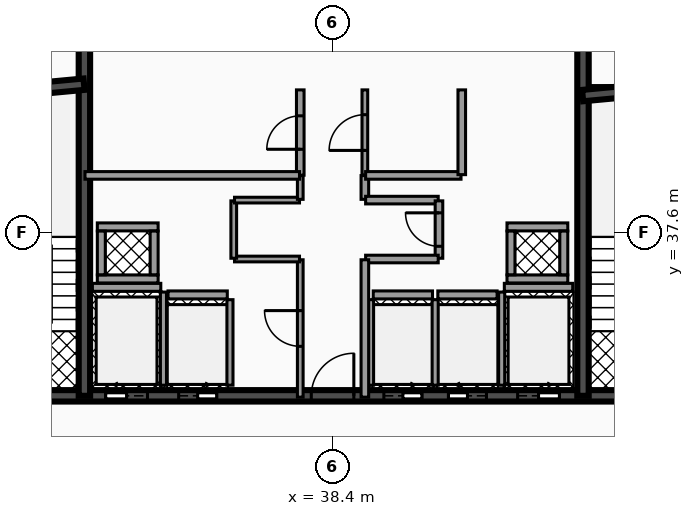
"""IFC4 building model, lengths in metres.
Left out: names, types, materials, properties, quantities, classifications, styles, units other than length and angle.
Written with IfcOpenShell. Run it as: python <this file> out.ifc"""

import sys

from ifc_helpers import new_model, si_unit, direction, frame, frame_2d, origin, place, context, subcontext, project, spatial, rectangle, extrude, element, fill, save


model = new_model("IFC4")
c1 = context("Model", 3, precision=1e-05, world=origin(), true_north=direction((0.0, 1.0)))
c2 = subcontext(c1, "Body", "Model", "MODEL_VIEW")
j1 = project(units=[si_unit("LENGTHUNIT", "METRE"), si_unit("PLANEANGLEUNIT", "RADIAN")], contexts=[c1])
p1 = place(None, origin())
s1 = spatial("IfcSite", under=j1, at=p1, CompositionType="ELEMENT")
p2 = place(p1, origin())
s2 = spatial("IfcBuilding", under=s1, at=p2, CompositionType="ELEMENT")
p3 = place(p2, frame((0.0, 0.0, 295.8)))
s3 = spatial("IfcBuildingStorey", under=s2, at=p3, CompositionType="ELEMENT", Elevation=295.8)
p4 = place(p3, frame((28.5, 33.3, 0.0), z_axis=(0.0, 0.0, 1.0), x_axis=(1.0, 0.0, 0.0)))
e1 = element("IfcWall", 1, at=p4, inside=s3, PredefinedType="SHEAR", context=c2, shape_type="SweptSolid", body=[
    extrude(rectangle(XDim=19.86, YDim=0.3, at=frame_2d((9.93, 0.0))), origin(), (0.0, 0.0, 1.0), 3.18),
])
p5 = place(p4, frame((3.93, 0.0, 0.0)))
e2 = element("IfcOpeningElement", 2, at=p5, cuts=e1, PredefinedType="OPENING", context=c2, shape_type="SweptSolid", body=[
    extrude(rectangle(XDim=1.1, YDim=2.15, at=frame_2d((0.55, 1.075))), frame((0.0, 0.16, 0.0), z_axis=(0.0, -1.0, 0.0), x_axis=(1.0, 0.0, 0.0)), (0.0, 0.0, 1.0), 0.32),
])
p6 = place(p4, frame((14.77, 0.0, 0.0)))
e3 = element("IfcOpeningElement", 3, at=p6, cuts=e1, PredefinedType="OPENING", context=c2, shape_type="SweptSolid", body=[
    extrude(rectangle(XDim=1.1, YDim=2.15, at=frame_2d((0.55, 1.075))), frame((0.0, 0.16, 0.0), z_axis=(0.0, -1.0, 0.0), x_axis=(1.0, 0.0, 0.0)), (0.0, 0.0, 1.0), 0.32),
])
p7 = place(p4, frame((11.25, 0.0, 0.0)))
e4 = element("IfcOpeningElement", 4, at=p7, cuts=e1, PredefinedType="OPENING", context=c2, shape_type="SweptSolid", body=[
    extrude(rectangle(XDim=1.0, YDim=2.1, at=frame_2d((0.5, 1.05))), frame((0.0, 0.16, 0.0), z_axis=(0.0, -1.0, 0.0), x_axis=(1.0, 0.0, 0.0)), (0.0, 0.0, 1.0), 0.32),
])
p8 = place(p4, frame((12.95, 0.0, 0.0)))
e5 = element("IfcOpeningElement", 5, at=p8, cuts=e1, PredefinedType="OPENING", context=c2, shape_type="SweptSolid", body=[
    extrude(rectangle(XDim=1.0, YDim=2.1, at=frame_2d((0.5, 1.05))), frame((0.0, 0.16, 0.0), z_axis=(0.0, -1.0, 0.0), x_axis=(1.0, 0.0, 0.0)), (0.0, 0.0, 1.0), 0.32),
])
p9 = place(p4, frame((5.85, 0.0, 0.0)))
e6 = element("IfcOpeningElement", 6, at=p9, cuts=e1, PredefinedType="OPENING", context=c2, shape_type="SweptSolid", body=[
    extrude(rectangle(XDim=1.0, YDim=2.1, at=frame_2d((0.5, 1.05))), frame((0.0, 0.16, 0.0), z_axis=(0.0, -1.0, 0.0), x_axis=(1.0, 0.0, 0.0)), (0.0, 0.0, 1.0), 0.32),
])
p10 = place(p4, frame((1.21, 0.0, 0.0)))
e7 = element("IfcOpeningElement", 7, at=p10, cuts=e1, PredefinedType="OPENING", context=c2, shape_type="SweptSolid", body=[
    extrude(rectangle(XDim=1.1, YDim=2.2, at=frame_2d((0.55, 1.1))), frame((0.0, 0.16, 0.0), z_axis=(0.0, -1.0, 0.0), x_axis=(1.0, 0.0, 0.0)), (0.0, 0.0, 1.0), 0.32),
])
p11 = place(p4, frame((9.34, 0.0, 0.0)))
e8 = element("IfcOpeningElement", 8, at=p11, cuts=e1, PredefinedType="OPENING", context=c2, shape_type="SweptSolid", body=[
    extrude(rectangle(XDim=1.12, YDim=2.05, at=frame_2d((0.56, 1.025))), frame((0.0, 0.16, 0.0), z_axis=(0.0, -1.0, 0.0), x_axis=(1.0, 0.0, 0.0)), (0.0, 0.0, 1.0), 0.32),
])
p12 = place(p4, frame((17.55, 0.0, 0.0)))
e9 = element("IfcOpeningElement", 9, at=p12, cuts=e1, PredefinedType="OPENING", context=c2, shape_type="SweptSolid", body=[
    extrude(rectangle(XDim=1.1, YDim=2.2, at=frame_2d((0.55, 1.1))), frame((0.0, 0.16, 0.0), z_axis=(0.0, -1.0, 0.0), x_axis=(1.0, 0.0, 0.0)), (0.0, 0.0, 1.0), 0.32),
])
for number, where, z_axis, x_axis in (
    (10, (31.87, 33.3, 0.0), (0.0, 0.0, 1.0), (0.0, 1.0, 0.0)),
    (11, (44.99, 33.3, 0.0), (0.0, 0.0, 1.0), (0.0, 1.0, 0.0)),
):
    element("IfcWall", number, at=place(p3, frame(where, z_axis=z_axis, x_axis=x_axis)), inside=s3, PredefinedType="SHEAR", context=c2, shape_type="SweptSolid", body=[
        extrude(rectangle(XDim=10.1, YDim=0.3, at=frame_2d((5.05, 0.0))), origin(), (0.0, 0.0, 1.0), 3.18),
    ])
p13 = place(p3, frame((28.64, 41.2, 0.0), z_axis=(0.0, 0.0, 1.0), x_axis=(0.995687118776, 0.092774789157, 0.0)))
e12 = element("IfcWall", 12, at=p13, inside=s3, PredefinedType="SHEAR", context=c2, shape_type="SweptSolid", body=[
    extrude(rectangle(XDim=3.234, YDim=0.3, at=frame_2d((1.617, 0.0))), origin(), (0.0, 0.0, 1.0), 3.18),
])
p14 = place(p3, frame((44.98, 41.2, 0.0), z_axis=(0.0, 0.0, 1.0), x_axis=(0.995686468965, 0.09278176286, 0.0)))
e13 = element("IfcWall", 13, at=p14, inside=s3, PredefinedType="SHEAR", context=c2, shape_type="SweptSolid", body=[
    extrude(rectangle(XDim=3.234, YDim=0.3, at=frame_2d((1.617, 0.0))), origin(), (0.0, 0.0, 1.0), 3.18),
])
p15 = place(p3, frame((32.08, 36.155, 0.0), z_axis=(0.0, 0.0, 1.0), x_axis=(1.0, 0.0, 0.0)))
e14 = element("IfcWall", 14, at=p15, inside=s3, PredefinedType="SOLIDWALL", context=c2, shape_type="SweptSolid", body=[
    extrude(rectangle(XDim=1.8, YDim=0.21, at=frame_2d((0.9, 0.0))), origin(), (0.0, 0.0, 1.0), 3.18),
])
p16 = place(p3, frame((33.95, 33.58, 0.0), z_axis=(0.0, 0.0, 1.0), x_axis=(0.0, 1.0, 0.0)))
e15 = element("IfcWall", 15, at=p16, inside=s3, PredefinedType="SOLIDWALL", context=c2, shape_type="SweptSolid", body=[
    extrude(rectangle(XDim=2.45, YDim=0.16, at=frame_2d((1.225, 0.0))), origin(), (0.0, 0.0, 1.0), 3.18),
])
p17 = place(p3, frame((42.92, 36.155, 0.0), z_axis=(0.0, 0.0, 1.0), x_axis=(1.0, 0.0, 0.0)))
e16 = element("IfcWall", 16, at=p17, inside=s3, PredefinedType="SOLIDWALL", context=c2, shape_type="SweptSolid", body=[
    extrude(rectangle(XDim=1.8, YDim=0.21, at=frame_2d((0.9, 0.0))), origin(), (0.0, 0.0, 1.0), 3.18),
])
p18 = place(p3, frame((42.85, 33.58, 0.0), z_axis=(0.0, 0.0, 1.0), x_axis=(0.0, 1.0, 0.0)))
e17 = element("IfcWall", 17, at=p18, inside=s3, PredefinedType="SOLIDWALL", context=c2, shape_type="SweptSolid", body=[
    extrude(rectangle(XDim=2.45, YDim=0.16, at=frame_2d((1.225, 0.0))), origin(), (0.0, 0.0, 1.0), 3.18),
])
p19 = place(p3, frame((39.47, 35.955, 0.0), z_axis=(0.0, 0.0, 1.0), x_axis=(1.0, 0.0, 0.0)))
e18 = element("IfcWall", 18, at=p19, inside=s3, PredefinedType="SOLIDWALL", context=c2, shape_type="SweptSolid", body=[
    extrude(rectangle(XDim=1.56, YDim=0.21, at=frame_2d((0.78, 0.0))), origin(), (0.0, 0.0, 1.0), 3.18),
])
for number, where, z_axis, x_axis in (
    (19, (39.4, 33.58, 0.0), (0.0, 0.0, 1.0), (0.0, 1.0, 0.0)),
    (20, (41.1, 33.58, 0.0), (0.0, 0.0, 1.0), (0.0, 1.0, 0.0)),
):
    element("IfcWall", number, at=place(p3, frame(where, z_axis=z_axis, x_axis=x_axis)), inside=s3, PredefinedType="SOLIDWALL", context=c2, shape_type="SweptSolid", body=[
        extrude(rectangle(XDim=2.25, YDim=0.16, at=frame_2d((1.125, 0.0))), origin(), (0.0, 0.0, 1.0), 3.18),
    ])
p20 = place(p3, frame((41.17, 35.955, 0.0), z_axis=(0.0, 0.0, 1.0), x_axis=(1.0, 0.0, 0.0)))
e21 = element("IfcWall", 21, at=p20, inside=s3, PredefinedType="SOLIDWALL", context=c2, shape_type="SweptSolid", body=[
    extrude(rectangle(XDim=1.56, YDim=0.21, at=frame_2d((0.78, 0.0))), origin(), (0.0, 0.0, 1.0), 3.18),
])
p21 = place(p3, frame((34.07, 35.955, 0.0), z_axis=(0.0, 0.0, 1.0), x_axis=(1.0, 0.0, 0.0)))
e22 = element("IfcWall", 22, at=p21, inside=s3, PredefinedType="SOLIDWALL", context=c2, shape_type="SweptSolid", body=[
    extrude(rectangle(XDim=1.56, YDim=0.21, at=frame_2d((0.78, 0.0))), origin(), (0.0, 0.0, 1.0), 3.18),
])
p22 = place(p3, frame((35.7, 33.58, 0.0), z_axis=(0.0, 0.0, 1.0), x_axis=(0.0, 1.0, 0.0)))
e23 = element("IfcWall", 23, at=p22, inside=s3, PredefinedType="SOLIDWALL", context=c2, shape_type="SweptSolid", body=[
    extrude(rectangle(XDim=2.25, YDim=0.16, at=frame_2d((1.125, 0.0))), origin(), (0.0, 0.0, 1.0), 3.18),
])
for number, where, z_axis, x_axis in (
    (24, (32.21, 36.375, 0.0), (0.0, 0.0, 1.0), (1.0, 0.0, 0.0)),
    (25, (32.21, 37.745, 0.0), (0.0, 0.0, 1.0), (1.0, 0.0, 0.0)),
):
    element("IfcWall", number, at=place(p3, frame(where, z_axis=z_axis, x_axis=x_axis)), inside=s3, PredefinedType="SOLIDWALL", context=c2, shape_type="SweptSolid", body=[
        extrude(rectangle(XDim=1.6, YDim=0.21, at=frame_2d((0.8, 0.0))), origin(), (0.0, 0.0, 1.0), 3.18),
    ])
for number, where, z_axis, x_axis in (
    (26, (32.315, 36.485, 0.0), (0.0, 0.0, 1.0), (0.0, 1.0, 0.0)),
    (27, (33.705, 36.485, 0.0), (0.0, 0.0, 1.0), (0.0, 1.0, 0.0)),
):
    element("IfcWall", number, at=place(p3, frame(where, z_axis=z_axis, x_axis=x_axis)), inside=s3, PredefinedType="SOLIDWALL", context=c2, shape_type="SweptSolid", body=[
        extrude(rectangle(XDim=1.15, YDim=0.21, at=frame_2d((0.575, 0.0))), origin(), (0.0, 0.0, 1.0), 3.18),
    ])
for number, where, z_axis, x_axis in (
    (28, (42.99, 36.375, 0.0), (0.0, 0.0, 1.0), (1.0, 0.0, 0.0)),
    (29, (42.99, 37.745, 0.0), (0.0, 0.0, 1.0), (1.0, 0.0, 0.0)),
):
    element("IfcWall", number, at=place(p3, frame(where, z_axis=z_axis, x_axis=x_axis)), inside=s3, PredefinedType="SOLIDWALL", context=c2, shape_type="SweptSolid", body=[
        extrude(rectangle(XDim=1.6, YDim=0.21, at=frame_2d((0.8, 0.0))), origin(), (0.0, 0.0, 1.0), 3.18),
    ])
for number, where, z_axis, x_axis in (
    (30, (43.095, 36.485, 0.0), (0.0, 0.0, 1.0), (0.0, 1.0, 0.0)),
    (31, (44.485, 36.485, 0.0), (0.0, 0.0, 1.0), (0.0, 1.0, 0.0)),
):
    element("IfcWall", number, at=place(p3, frame(where, z_axis=z_axis, x_axis=x_axis)), inside=s3, PredefinedType="SOLIDWALL", context=c2, shape_type="SweptSolid", body=[
        extrude(rectangle(XDim=1.15, YDim=0.21, at=frame_2d((0.575, 0.0))), origin(), (0.0, 0.0, 1.0), 3.18),
    ])
p23 = place(p3, frame((37.55, 33.265, 0.0), z_axis=(0.0, 0.0, 1.0), x_axis=(0.0, 1.0, 0.0)))
e32 = element("IfcWall", 32, at=p23, inside=s3, PredefinedType="PARTITIONING", context=c2, shape_type="SweptSolid", body=[
    extrude(rectangle(XDim=3.615, YDim=0.15, at=frame_2d((1.808, 0.0))), origin(), (0.0, 0.0, 1.0), 2.235),
])
p24 = place(p23, frame((1.337, 0.0, 0.0)))
e33 = element("IfcOpeningElement", 33, at=p24, cuts=e32, PredefinedType="OPENING", context=c2, shape_type="SweptSolid", body=[
    extrude(rectangle(XDim=0.94, YDim=2.05, at=frame_2d((0.47, 1.025))), frame((0.0, 0.085, 0.0), z_axis=(0.0, -1.0, 0.0), x_axis=(1.0, 0.0, 0.0)), (0.0, 0.0, 1.0), 0.17),
])
p25 = place(p3, frame((35.82, 36.9, 0.0), z_axis=(0.0, 0.0, 1.0), x_axis=(1.0, 0.0, 0.0)))
e34 = element("IfcWall", 34, at=p25, inside=s3, PredefinedType="PARTITIONING", context=c2, shape_type="SweptSolid", body=[
    extrude(rectangle(XDim=1.71, YDim=0.15, at=frame_2d((0.855, 0.0))), origin(), (0.0, 0.0, 1.0), 2.235),
])
p26 = place(p3, frame((35.8, 36.92, 0.0), z_axis=(0.0, 0.0, 1.0), x_axis=(0.0, 1.0, 0.0)))
e35 = element("IfcWall", 35, at=p26, inside=s3, PredefinedType="PARTITIONING", context=c2, shape_type="SweptSolid", body=[
    extrude(rectangle(XDim=1.51, YDim=0.15, at=frame_2d((0.755, 0.0))), origin(), (0.0, 0.0, 1.0), 2.235),
])
p27 = place(p3, frame((35.82, 38.45, 0.0), z_axis=(0.0, 0.0, 1.0), x_axis=(1.0, 0.0, 0.0)))
e36 = element("IfcWall", 36, at=p27, inside=s3, PredefinedType="PARTITIONING", context=c2, shape_type="SweptSolid", body=[
    extrude(rectangle(XDim=1.71, YDim=0.15, at=frame_2d((0.855, 0.0))), origin(), (0.0, 0.0, 1.0), 2.235),
])
p28 = place(p3, frame((37.55, 38.47, 0.0), z_axis=(0.0, 0.0, 1.0), x_axis=(0.0, 1.0, 0.0)))
e37 = element("IfcWall", 37, at=p28, inside=s3, PredefinedType="PARTITIONING", context=c2, shape_type="SweptSolid", body=[
    extrude(rectangle(XDim=0.625, YDim=0.15, at=frame_2d((0.312, 0.0))), origin(), (0.0, 0.0, 1.0), 2.235),
])
p29 = place(p3, frame((37.55, 39.105, 0.0), z_axis=(0.0, 0.0, 1.0), x_axis=(0.0, 1.0, 0.0)))
e38 = element("IfcWall", 38, at=p29, inside=s3, PredefinedType="PARTITIONING", context=c2, shape_type="SweptSolid", body=[
    extrude(rectangle(XDim=2.245, YDim=0.2, at=frame_2d((1.123, 0.0))), origin(), (0.0, 0.0, 1.0), 2.235),
])
p30 = place(p29, frame((0.683, 0.0, 0.0)))
e39 = element("IfcOpeningElement", 39, at=p30, cuts=e38, PredefinedType="OPENING", context=c2, shape_type="SweptSolid", body=[
    extrude(rectangle(XDim=0.88, YDim=2.05, at=frame_2d((0.44, 1.025))), frame((0.0, 0.11, 0.0), z_axis=(0.0, -1.0, 0.0), x_axis=(1.0, 0.0, 0.0)), (0.0, 0.0, 1.0), 0.22),
])
p31 = place(p3, frame((39.25, 38.47, 0.0), z_axis=(0.0, 0.0, 1.0), x_axis=(0.0, 1.0, 0.0)))
e40 = element("IfcWall", 40, at=p31, inside=s3, PredefinedType="PARTITIONING", context=c2, shape_type="SweptSolid", body=[
    extrude(rectangle(XDim=0.625, YDim=0.2, at=frame_2d((0.312, 0.0))), origin(), (0.0, 0.0, 1.0), 2.235),
])
p32 = place(p3, frame((39.27, 38.45, 0.0), z_axis=(0.0, 0.0, 1.0), x_axis=(1.0, 0.0, 0.0)))
e41 = element("IfcWall", 41, at=p32, inside=s3, PredefinedType="PARTITIONING", context=c2, shape_type="SweptSolid", body=[
    extrude(rectangle(XDim=1.91, YDim=0.2, at=frame_2d((0.955, 0.0))), origin(), (0.0, 0.0, 1.0), 2.235),
])
p33 = place(p3, frame((41.2, 36.92, 0.0), z_axis=(0.0, 0.0, 1.0), x_axis=(0.0, 1.0, 0.0)))
e42 = element("IfcWall", 42, at=p33, inside=s3, PredefinedType="PARTITIONING", context=c2, shape_type="SweptSolid", body=[
    extrude(rectangle(XDim=1.51, YDim=0.2, at=frame_2d((0.755, 0.0))), origin(), (0.0, 0.0, 1.0), 2.235),
])
p34 = place(p33, frame((0.315, 0.0, 0.0)))
e43 = element("IfcOpeningElement", 43, at=p34, cuts=e42, PredefinedType="OPENING", context=c2, shape_type="SweptSolid", body=[
    extrude(rectangle(XDim=0.88, YDim=2.05, at=frame_2d((0.44, 1.025))), frame((0.0, 0.11, 0.0), z_axis=(0.0, -1.0, 0.0), x_axis=(1.0, 0.0, 0.0)), (0.0, 0.0, 1.0), 0.22),
])
p35 = place(p3, frame((39.27, 36.9, 0.0), z_axis=(0.0, 0.0, 1.0), x_axis=(1.0, 0.0, 0.0)))
e44 = element("IfcWall", 44, at=p35, inside=s3, PredefinedType="PARTITIONING", context=c2, shape_type="SweptSolid", body=[
    extrude(rectangle(XDim=1.91, YDim=0.2, at=frame_2d((0.955, 0.0))), origin(), (0.0, 0.0, 1.0), 2.235),
])
p36 = place(p3, frame((39.25, 33.265, 0.0), z_axis=(0.0, 0.0, 1.0), x_axis=(0.0, 1.0, 0.0)))
e45 = element("IfcWall", 45, at=p36, inside=s3, PredefinedType="PARTITIONING", context=c2, shape_type="SweptSolid", body=[
    extrude(rectangle(XDim=3.615, YDim=0.2, at=frame_2d((1.808, 0.0))), origin(), (0.0, 0.0, 1.0), 2.235),
])
p37 = place(p3, frame((39.25, 39.105, 0.0), z_axis=(0.0, 0.0, 1.0), x_axis=(0.0, 1.0, 0.0)))
e46 = element("IfcWall", 46, at=p37, inside=s3, PredefinedType="PARTITIONING", context=c2, shape_type="SweptSolid", body=[
    extrude(rectangle(XDim=2.245, YDim=0.15, at=frame_2d((1.123, 0.0))), origin(), (0.0, 0.0, 1.0), 2.235),
])
p38 = place(p37, frame((0.653, 0.0, 0.0)))
e47 = element("IfcOpeningElement", 47, at=p38, cuts=e46, PredefinedType="OPENING", context=c2, shape_type="SweptSolid", body=[
    extrude(rectangle(XDim=0.94, YDim=2.05, at=frame_2d((0.47, 1.025))), frame((0.0, 0.085, 0.0), z_axis=(0.0, -1.0, 0.0), x_axis=(1.0, 0.0, 0.0)), (0.0, 0.0, 1.0), 0.17),
])
p39 = place(p3, frame((31.885, 39.1, 0.0), z_axis=(0.0, 0.0, 1.0), x_axis=(1.0, 0.0, 0.0)))
e48 = element("IfcWall", 48, at=p39, inside=s3, PredefinedType="PARTITIONING", context=c2, shape_type="SweptSolid", body=[
    extrude(rectangle(XDim=5.645, YDim=0.2, at=frame_2d((2.823, 0.0))), origin(), (0.0, 0.0, 1.0), 2.235),
])
p40 = place(p3, frame((39.27, 39.1, 0.0), z_axis=(0.0, 0.0, 1.0), x_axis=(1.0, 0.0, 0.0)))
e49 = element("IfcWall", 49, at=p40, inside=s3, PredefinedType="PARTITIONING", context=c2, shape_type="SweptSolid", body=[
    extrude(rectangle(XDim=2.51, YDim=0.2, at=frame_2d((1.255, 0.0))), origin(), (0.0, 0.0, 1.0), 2.235),
])
p41 = place(p3, frame((41.8, 39.12, 0.0), z_axis=(0.0, 0.0, 1.0), x_axis=(0.0, 1.0, 0.0)))
e50 = element("IfcWall", 50, at=p41, inside=s3, PredefinedType="PARTITIONING", context=c2, shape_type="SweptSolid", body=[
    extrude(rectangle(XDim=2.23, YDim=0.2, at=frame_2d((1.115, 0.0))), origin(), (0.0, 0.0, 1.0), 2.235),
])
p42 = place(p5, origin())
e51 = element("IfcDoor", 51, at=p42, inside=s3, OperationType="SLIDING_TO_LEFT", PredefinedType="DOOR", context=c2, shape_type="SweptSolid", body=[
    extrude(rectangle(XDim=1.1, YDim=2.15, at=frame_2d((0.55, 1.075))), frame((0.0, 0.025, 0.0), z_axis=(0.0, -1.0, 0.0), x_axis=(1.0, 0.0, 0.0)), (0.0, 0.0, 1.0), 0.05),
])
fill(e2, e51)
p43 = place(p6, origin())
e52 = element("IfcDoor", 52, at=p43, inside=s3, OperationType="SLIDING_TO_RIGHT", PredefinedType="DOOR", context=c2, shape_type="SweptSolid", body=[
    extrude(rectangle(XDim=1.1, YDim=2.15, at=frame_2d((0.55, 1.075))), frame((0.0, 0.025, 0.0), z_axis=(0.0, -1.0, 0.0), x_axis=(1.0, 0.0, 0.0)), (0.0, 0.0, 1.0), 0.05),
])
fill(e3, e52)
p44 = place(p7, origin())
e53 = element("IfcDoor", 53, at=p44, inside=s3, OperationType="SLIDING_TO_RIGHT", PredefinedType="DOOR", context=c2, shape_type="SweptSolid", body=[
    extrude(rectangle(XDim=1.0, YDim=2.1, at=frame_2d((0.5, 1.05))), frame((0.0, 0.025, 0.0), z_axis=(0.0, -1.0, 0.0), x_axis=(1.0, 0.0, 0.0)), (0.0, 0.0, 1.0), 0.05),
])
fill(e4, e53)
p45 = place(p8, origin())
e54 = element("IfcDoor", 54, at=p45, inside=s3, OperationType="SLIDING_TO_LEFT", PredefinedType="DOOR", context=c2, shape_type="SweptSolid", body=[
    extrude(rectangle(XDim=1.0, YDim=2.1, at=frame_2d((0.5, 1.05))), frame((0.0, 0.025, 0.0), z_axis=(0.0, -1.0, 0.0), x_axis=(1.0, 0.0, 0.0)), (0.0, 0.0, 1.0), 0.05),
])
fill(e5, e54)
p46 = place(p9, origin())
e55 = element("IfcDoor", 55, at=p46, inside=s3, OperationType="SLIDING_TO_RIGHT", PredefinedType="DOOR", context=c2, shape_type="SweptSolid", body=[
    extrude(rectangle(XDim=1.0, YDim=2.1, at=frame_2d((0.5, 1.05))), frame((0.0, 0.025, 0.0), z_axis=(0.0, -1.0, 0.0), x_axis=(1.0, 0.0, 0.0)), (0.0, 0.0, 1.0), 0.05),
])
fill(e6, e55)
p47 = place(p11, origin())
e56 = element("IfcDoor", 56, at=p47, inside=s3, OperationType="SINGLE_SWING_RIGHT", PredefinedType="DOOR", context=c2, shape_type="SweptSolid", body=[
    extrude(rectangle(XDim=1.12, YDim=2.05, at=frame_2d((0.56, 1.025))), frame((0.0, 0.025, 0.0), z_axis=(0.0, -1.0, 0.0), x_axis=(1.0, 0.0, 0.0)), (0.0, 0.0, 1.0), 0.05),
])
fill(e8, e56)
p48 = place(p24, origin())
e57 = element("IfcDoor", 57, at=p48, inside=s3, OperationType="SINGLE_SWING_RIGHT", PredefinedType="DOOR", context=c2, shape_type="SweptSolid", body=[
    extrude(rectangle(XDim=0.94, YDim=2.05, at=frame_2d((0.47, 1.025))), frame((0.0, 0.025, 0.0), z_axis=(0.0, -1.0, 0.0), x_axis=(1.0, 0.0, 0.0)), (0.0, 0.0, 1.0), 0.05),
])
fill(e33, e57)
p49 = place(p30, origin())
e58 = element("IfcDoor", 58, at=p49, inside=s3, OperationType="SINGLE_SWING_LEFT", PredefinedType="DOOR", context=c2, shape_type="SweptSolid", body=[
    extrude(rectangle(XDim=0.88, YDim=2.05, at=frame_2d((0.44, 1.025))), frame((0.0, 0.025, 0.0), z_axis=(0.0, -1.0, 0.0), x_axis=(1.0, 0.0, 0.0)), (0.0, 0.0, 1.0), 0.05),
])
fill(e39, e58)
p50 = place(p34, origin())
e59 = element("IfcDoor", 59, at=p50, inside=s3, OperationType="SINGLE_SWING_RIGHT", PredefinedType="DOOR", context=c2, shape_type="SweptSolid", body=[
    extrude(rectangle(XDim=0.88, YDim=2.05, at=frame_2d((0.44, 1.025))), frame((0.0, 0.025, 0.0), z_axis=(0.0, -1.0, 0.0), x_axis=(1.0, 0.0, 0.0)), (0.0, 0.0, 1.0), 0.05),
])
fill(e43, e59)
p51 = place(p38, origin())
e60 = element("IfcDoor", 60, at=p51, inside=s3, OperationType="SINGLE_SWING_LEFT", PredefinedType="DOOR", context=c2, shape_type="SweptSolid", body=[
    extrude(rectangle(XDim=0.94, YDim=2.05, at=frame_2d((0.47, 1.025))), frame((0.0, 0.025, 0.0), z_axis=(0.0, -1.0, 0.0), x_axis=(1.0, 0.0, 0.0)), (0.0, 0.0, 1.0), 0.05),
])
fill(e47, e60)
save(model, sys.argv[1])
